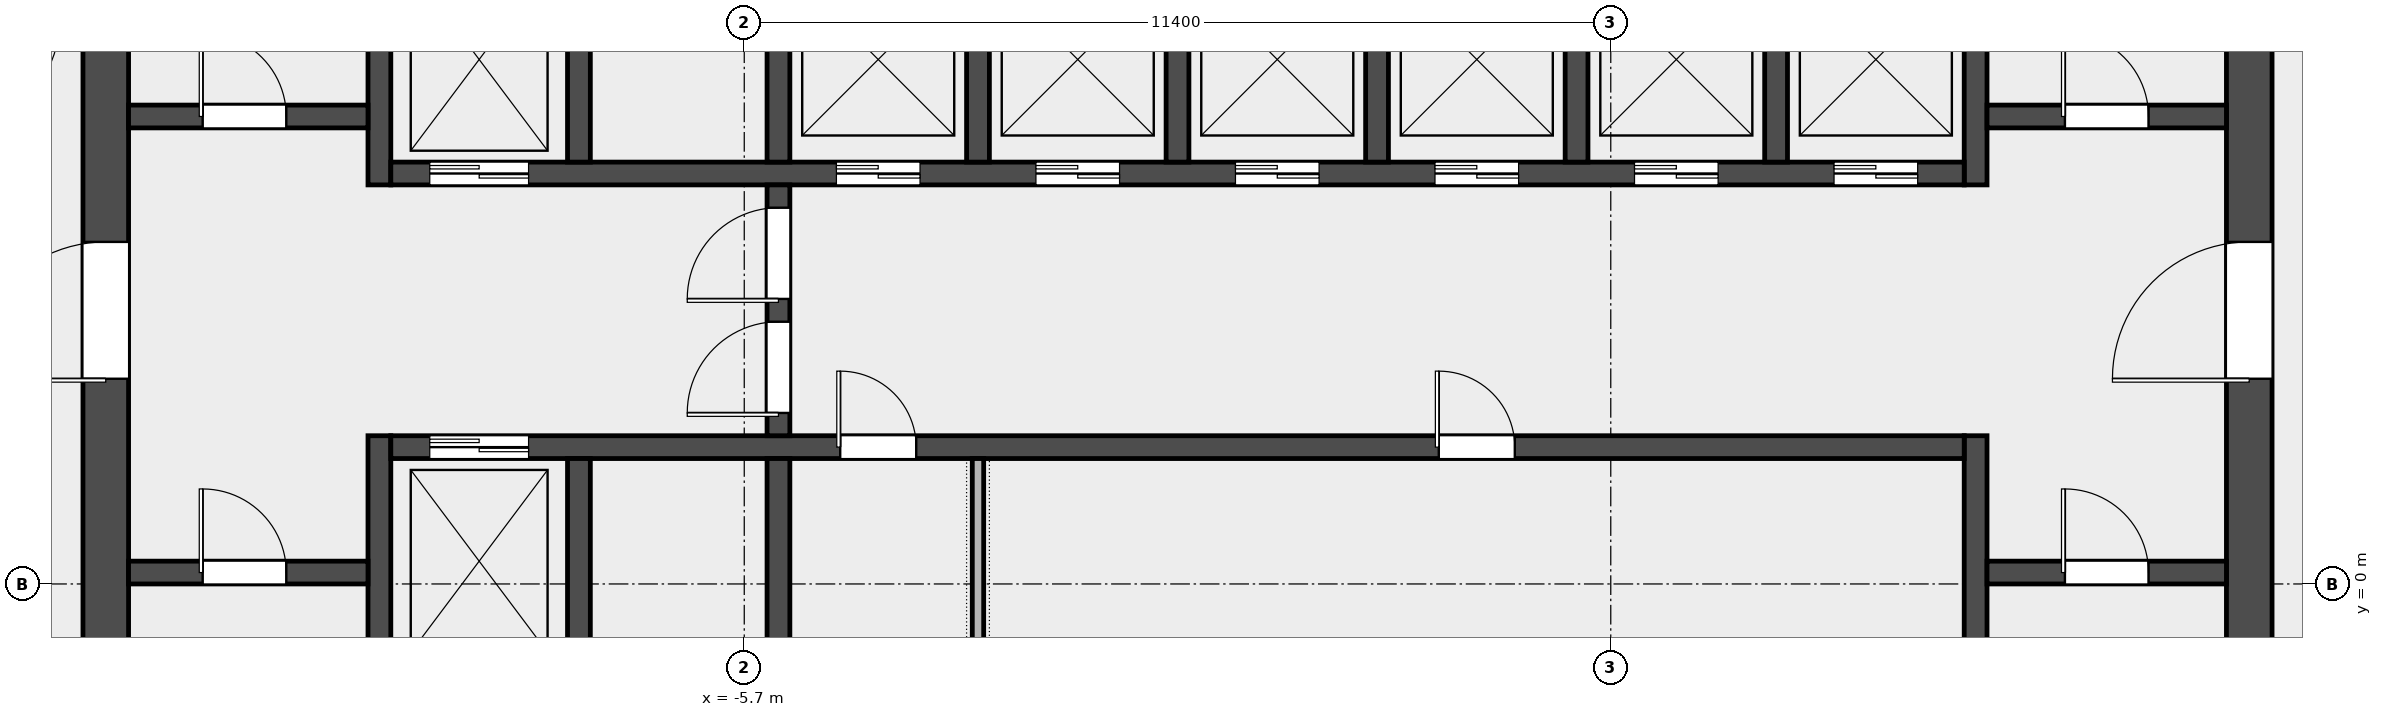
"""IFC4 building model, lengths in metres.
Left out: names, types, materials, properties, quantities, classifications, styles, units other than length and angle.
Written with IfcOpenShell. Run it as: python <this file> out.ifc"""

import sys

from ifc_helpers import new_model, si_unit, direction, frame, frame_2d, origin, place, context, subcontext, project, spatial, rectangle, extrude, element, fill, save


model = new_model("IFC4")
c1 = context("Model", 3, precision=1e-05, world=origin(), true_north=direction((0.0, 1.0)))
c2 = subcontext(c1, "Body", "Model", "MODEL_VIEW")
j1 = project(units=[si_unit("LENGTHUNIT", "METRE"), si_unit("PLANEANGLEUNIT", "RADIAN")], contexts=[c1])
p1 = place(None, origin())
s1 = spatial("IfcSite", under=j1, at=p1, CompositionType="ELEMENT")
p2 = place(p1, origin())
s2 = spatial("IfcBuilding", under=s1, at=p2, CompositionType="ELEMENT")
p3 = place(p2, frame((0.0, 0.0, 235.0)))
s3 = spatial("IfcBuildingStorey", under=s2, at=p3, CompositionType="ELEMENT", Elevation=235.0)
p4 = place(p3, frame((-14.1, -6.6, 0.0), z_axis=(0.0, 0.0, 1.0), x_axis=(0.0, 1.0, 0.0)))
e1 = element("IfcWall", 1, at=p4, inside=s3, PredefinedType="SHEAR", context=c2, shape_type="SweptSolid", body=[
    extrude(rectangle(XDim=19.5, YDim=0.6, at=frame_2d((9.75, 0.0))), origin(), (0.0, 0.0, 1.0), 3.7),
])
p5 = place(p4, frame((9.3, 0.0, 0.0)))
e2 = element("IfcOpeningElement", 2, at=p5, cuts=e1, PredefinedType="OPENING", context=c2, shape_type="SweptSolid", body=[
    extrude(rectangle(XDim=1.8, YDim=2.1, at=frame_2d((0.9, 1.05))), frame((0.0, 0.312, 0.0), z_axis=(0.0, -1.0, 0.0), x_axis=(1.0, 0.0, 0.0)), (0.0, 0.0, 1.0), 0.624),
])
p6 = place(p3, frame((14.1, -6.6, 0.0), z_axis=(0.0, 0.0, 1.0), x_axis=(0.0, 1.0, 0.0)))
e3 = element("IfcWall", 3, at=p6, inside=s3, PredefinedType="SHEAR", context=c2, shape_type="SweptSolid", body=[
    extrude(rectangle(XDim=19.5, YDim=0.6, at=frame_2d((9.75, 0.0))), origin(), (0.0, 0.0, 1.0), 3.7),
])
p7 = place(p6, frame((9.3, 0.0, 0.0)))
e4 = element("IfcOpeningElement", 4, at=p7, cuts=e3, PredefinedType="OPENING", context=c2, shape_type="SweptSolid", body=[
    extrude(rectangle(XDim=1.8, YDim=2.1, at=frame_2d((0.9, 1.05))), frame((0.0, 0.312, 0.0), z_axis=(0.0, -1.0, 0.0), x_axis=(1.0, 0.0, 0.0)), (0.0, 0.0, 1.0), 0.624),
])
p8 = place(p3, frame((-10.5, -6.6, 0.0), z_axis=(0.0, 0.0, 1.0), x_axis=(0.0, 1.0, 0.0)))
e5 = element("IfcWall", 5, at=p8, inside=s3, PredefinedType="SHEAR", context=c2, shape_type="SweptSolid", body=[
    extrude(rectangle(XDim=8.55, YDim=0.3, at=frame_2d((4.275, 0.0))), origin(), (0.0, 0.0, 1.0), 3.7),
])
p9 = place(p3, frame((-10.5, 5.25, 0.0), z_axis=(0.0, 0.0, 1.0), x_axis=(0.0, 1.0, 0.0)))
e6 = element("IfcWall", 6, at=p9, inside=s3, PredefinedType="SHEAR", context=c2, shape_type="SweptSolid", body=[
    extrude(rectangle(XDim=7.65, YDim=0.3, at=frame_2d((3.825, 0.0))), origin(), (0.0, 0.0, 1.0), 3.7),
])
p10 = place(p3, frame((10.5, -6.6, 0.0), z_axis=(0.0, 0.0, 1.0), x_axis=(0.0, 1.0, 0.0)))
e7 = element("IfcWall", 7, at=p10, inside=s3, PredefinedType="SHEAR", context=c2, shape_type="SweptSolid", body=[
    extrude(rectangle(XDim=8.55, YDim=0.3, at=frame_2d((4.275, 0.0))), origin(), (0.0, 0.0, 1.0), 3.7),
])
p11 = place(p3, frame((10.5, 5.25, 0.0), z_axis=(0.0, 0.0, 1.0), x_axis=(0.0, 1.0, 0.0)))
e8 = element("IfcWall", 8, at=p11, inside=s3, PredefinedType="SHEAR", context=c2, shape_type="SweptSolid", body=[
    extrude(rectangle(XDim=7.65, YDim=0.3, at=frame_2d((3.825, 0.0))), origin(), (0.0, 0.0, 1.0), 3.7),
])
p12 = place(p3, frame((-13.8, 0.15, 0.0), z_axis=(0.0, 0.0, 1.0), x_axis=(1.0, 0.0, 0.0)))
e9 = element("IfcWall", 9, at=p12, inside=s3, PredefinedType="SOLIDWALL", context=c2, shape_type="SweptSolid", body=[
    extrude(rectangle(XDim=3.15, YDim=0.3, at=frame_2d((1.575, 0.0))), origin(), (0.0, 0.0, 1.0), 3.7),
])
p13 = place(p12, frame((0.975, 0.0, 0.0)))
e10 = element("IfcOpeningElement", 10, at=p13, cuts=e9, PredefinedType="OPENING", context=c2, shape_type="SweptSolid", body=[
    extrude(rectangle(XDim=1.1, YDim=2.1, at=frame_2d((0.55, 1.05))), frame((0.0, 0.162, 0.0), z_axis=(0.0, -1.0, 0.0), x_axis=(1.0, 0.0, 0.0)), (0.0, 0.0, 1.0), 0.324),
])
p14 = place(p3, frame((-13.8, 6.15, 0.0), z_axis=(0.0, 0.0, 1.0), x_axis=(1.0, 0.0, 0.0)))
e11 = element("IfcWall", 11, at=p14, inside=s3, PredefinedType="SOLIDWALL", context=c2, shape_type="SweptSolid", body=[
    extrude(rectangle(XDim=3.15, YDim=0.3, at=frame_2d((1.575, 0.0))), origin(), (0.0, 0.0, 1.0), 3.7),
])
p15 = place(p14, frame((0.975, 0.0, 0.0)))
e12 = element("IfcOpeningElement", 12, at=p15, cuts=e11, PredefinedType="OPENING", context=c2, shape_type="SweptSolid", body=[
    extrude(rectangle(XDim=1.1, YDim=2.1, at=frame_2d((0.55, 1.05))), frame((0.0, 0.162, 0.0), z_axis=(0.0, -1.0, 0.0), x_axis=(1.0, 0.0, 0.0)), (0.0, 0.0, 1.0), 0.324),
])
p16 = place(p3, frame((10.65, 0.15, 0.0), z_axis=(0.0, 0.0, 1.0), x_axis=(1.0, 0.0, 0.0)))
e13 = element("IfcWall", 13, at=p16, inside=s3, PredefinedType="SOLIDWALL", context=c2, shape_type="SweptSolid", body=[
    extrude(rectangle(XDim=3.15, YDim=0.3, at=frame_2d((1.575, 0.0))), origin(), (0.0, 0.0, 1.0), 3.7),
])
p17 = place(p16, frame((1.025, 0.0, 0.0)))
e14 = element("IfcOpeningElement", 14, at=p17, cuts=e13, PredefinedType="OPENING", context=c2, shape_type="SweptSolid", body=[
    extrude(rectangle(XDim=1.1, YDim=2.1, at=frame_2d((0.55, 1.05))), frame((0.0, 0.162, 0.0), z_axis=(0.0, -1.0, 0.0), x_axis=(1.0, 0.0, 0.0)), (0.0, 0.0, 1.0), 0.324),
])
p18 = place(p3, frame((10.65, 6.15, 0.0), z_axis=(0.0, 0.0, 1.0), x_axis=(1.0, 0.0, 0.0)))
e15 = element("IfcWall", 15, at=p18, inside=s3, PredefinedType="SOLIDWALL", context=c2, shape_type="SweptSolid", body=[
    extrude(rectangle(XDim=3.15, YDim=0.3, at=frame_2d((1.575, 0.0))), origin(), (0.0, 0.0, 1.0), 3.7),
])
p19 = place(p18, frame((1.025, 0.0, 0.0)))
e16 = element("IfcOpeningElement", 16, at=p19, cuts=e15, PredefinedType="OPENING", context=c2, shape_type="SweptSolid", body=[
    extrude(rectangle(XDim=1.1, YDim=2.1, at=frame_2d((0.55, 1.05))), frame((0.0, 0.162, 0.0), z_axis=(0.0, -1.0, 0.0), x_axis=(1.0, 0.0, 0.0)), (0.0, 0.0, 1.0), 0.324),
])
p20 = place(p3, frame((-10.35, 1.8, 0.0), z_axis=(0.0, 0.0, 1.0), x_axis=(1.0, 0.0, 0.0)))
e17 = element("IfcWall", 17, at=p20, inside=s3, PredefinedType="SOLIDWALL", context=c2, shape_type="SweptSolid", body=[
    extrude(rectangle(XDim=20.7, YDim=0.3, at=frame_2d((10.35, 0.0))), origin(), (0.0, 0.0, 1.0), 3.7),
])
p21 = place(p20, frame((0.512, 0.0, 0.0)))
e18 = element("IfcOpeningElement", 18, at=p21, cuts=e17, PredefinedType="OPENING", context=c2, shape_type="SweptSolid", body=[
    extrude(rectangle(XDim=1.3, YDim=2.1, at=frame_2d((0.65, 1.05))), frame((0.0, 0.162, 0.0), z_axis=(0.0, -1.0, 0.0), x_axis=(1.0, 0.0, 0.0)), (0.0, 0.0, 1.0), 0.324),
])
p22 = place(p20, frame((5.913, 0.0, 0.0)))
e19 = element("IfcOpeningElement", 19, at=p22, cuts=e17, PredefinedType="OPENING", context=c2, shape_type="SweptSolid", body=[
    extrude(rectangle(XDim=1.0, YDim=2.1, at=frame_2d((0.5, 1.05))), frame((0.0, 0.162, 0.0), z_axis=(0.0, -1.0, 0.0), x_axis=(1.0, 0.0, 0.0)), (0.0, 0.0, 1.0), 0.324),
])
p23 = place(p20, frame((13.788, 0.0, 0.0)))
e20 = element("IfcOpeningElement", 20, at=p23, cuts=e17, PredefinedType="OPENING", context=c2, shape_type="SweptSolid", body=[
    extrude(rectangle(XDim=1.0, YDim=2.1, at=frame_2d((0.5, 1.05))), frame((0.0, 0.162, 0.0), z_axis=(0.0, -1.0, 0.0), x_axis=(1.0, 0.0, 0.0)), (0.0, 0.0, 1.0), 0.324),
])
p24 = place(p3, frame((-10.35, 5.4, 0.0), z_axis=(0.0, 0.0, 1.0), x_axis=(1.0, 0.0, 0.0)))
e21 = element("IfcWall", 21, at=p24, inside=s3, PredefinedType="SOLIDWALL", context=c2, shape_type="SweptSolid", body=[
    extrude(rectangle(XDim=20.7, YDim=0.3, at=frame_2d((10.35, 0.0))), origin(), (0.0, 0.0, 1.0), 3.7),
])
p25 = place(p24, frame((0.512, 0.0, 0.0)))
e22 = element("IfcOpeningElement", 22, at=p25, cuts=e21, PredefinedType="OPENING", context=c2, shape_type="SweptSolid", body=[
    extrude(rectangle(XDim=1.3, YDim=2.1, at=frame_2d((0.65, 1.05))), frame((0.0, 0.162, 0.0), z_axis=(0.0, -1.0, 0.0), x_axis=(1.0, 0.0, 0.0)), (0.0, 0.0, 1.0), 0.324),
])
p26 = place(p24, frame((5.863, 0.0, 0.0)))
e23 = element("IfcOpeningElement", 23, at=p26, cuts=e21, PredefinedType="OPENING", context=c2, shape_type="SweptSolid", body=[
    extrude(rectangle(XDim=1.1, YDim=2.1, at=frame_2d((0.55, 1.05))), frame((0.0, 0.162, 0.0), z_axis=(0.0, -1.0, 0.0), x_axis=(1.0, 0.0, 0.0)), (0.0, 0.0, 1.0), 0.324),
])
p27 = place(p24, frame((8.488, 0.0, 0.0)))
e24 = element("IfcOpeningElement", 24, at=p27, cuts=e21, PredefinedType="OPENING", context=c2, shape_type="SweptSolid", body=[
    extrude(rectangle(XDim=1.1, YDim=2.1, at=frame_2d((0.55, 1.05))), frame((0.0, 0.162, 0.0), z_axis=(0.0, -1.0, 0.0), x_axis=(1.0, 0.0, 0.0)), (0.0, 0.0, 1.0), 0.324),
])
p28 = place(p24, frame((11.113, 0.0, 0.0)))
e25 = element("IfcOpeningElement", 25, at=p28, cuts=e21, PredefinedType="OPENING", context=c2, shape_type="SweptSolid", body=[
    extrude(rectangle(XDim=1.1, YDim=2.1, at=frame_2d((0.55, 1.05))), frame((0.0, 0.162, 0.0), z_axis=(0.0, -1.0, 0.0), x_axis=(1.0, 0.0, 0.0)), (0.0, 0.0, 1.0), 0.324),
])
p29 = place(p24, frame((13.738, 0.0, 0.0)))
e26 = element("IfcOpeningElement", 26, at=p29, cuts=e21, PredefinedType="OPENING", context=c2, shape_type="SweptSolid", body=[
    extrude(rectangle(XDim=1.1, YDim=2.1, at=frame_2d((0.55, 1.05))), frame((0.0, 0.162, 0.0), z_axis=(0.0, -1.0, 0.0), x_axis=(1.0, 0.0, 0.0)), (0.0, 0.0, 1.0), 0.324),
])
p30 = place(p24, frame((16.363, 0.0, 0.0)))
e27 = element("IfcOpeningElement", 27, at=p30, cuts=e21, PredefinedType="OPENING", context=c2, shape_type="SweptSolid", body=[
    extrude(rectangle(XDim=1.1, YDim=2.1, at=frame_2d((0.55, 1.05))), frame((0.0, 0.162, 0.0), z_axis=(0.0, -1.0, 0.0), x_axis=(1.0, 0.0, 0.0)), (0.0, 0.0, 1.0), 0.324),
])
p31 = place(p24, frame((18.988, 0.0, 0.0)))
e28 = element("IfcOpeningElement", 28, at=p31, cuts=e21, PredefinedType="OPENING", context=c2, shape_type="SweptSolid", body=[
    extrude(rectangle(XDim=1.1, YDim=2.1, at=frame_2d((0.55, 1.05))), frame((0.0, 0.162, 0.0), z_axis=(0.0, -1.0, 0.0), x_axis=(1.0, 0.0, 0.0)), (0.0, 0.0, 1.0), 0.324),
])
for number, where, z_axis, x_axis in (
    (29, (-7.875, -1.05, 0.0), (0.0, 0.0, 1.0), (0.0, 1.0, 0.0)),
    (30, (-5.25, -1.05, 0.0), (0.0, 0.0, 1.0), (0.0, 1.0, 0.0)),
    (31, (-7.875, 5.55, 0.0), (0.0, 0.0, 1.0), (0.0, 1.0, 0.0)),
    (32, (-5.25, 5.55, 0.0), (0.0, 0.0, 1.0), (0.0, 1.0, 0.0)),
    (33, (-2.625, 5.55, 0.0), (0.0, 0.0, 1.0), (0.0, 1.0, 0.0)),
    (34, (0.0, 5.55, 0.0), (0.0, 0.0, 1.0), (0.0, 1.0, 0.0)),
    (35, (2.625, 5.55, 0.0), (0.0, 0.0, 1.0), (0.0, 1.0, 0.0)),
    (36, (5.25, 5.55, 0.0), (0.0, 0.0, 1.0), (0.0, 1.0, 0.0)),
    (37, (7.875, 5.55, 0.0), (0.0, 0.0, 1.0), (0.0, 1.0, 0.0)),
):
    element("IfcWall", number, at=place(p3, frame(where, z_axis=z_axis, x_axis=x_axis)), inside=s3, PredefinedType="SOLIDWALL", context=c2, shape_type="SweptSolid", body=[
        extrude(rectangle(XDim=2.7, YDim=0.3, at=frame_2d((1.35, 0.0))), origin(), (0.0, 0.0, 1.0), 3.7),
    ])
p32 = place(p3, frame((-5.25, 1.95, 0.0), z_axis=(0.0, 0.0, 1.0), x_axis=(0.0, 1.0, 0.0)))
e38 = element("IfcWall", 38, at=p32, inside=s3, PredefinedType="SOLIDWALL", context=c2, shape_type="SweptSolid", body=[
    extrude(rectangle(XDim=3.3, YDim=0.3, at=frame_2d((1.65, 0.0))), origin(), (0.0, 0.0, 1.0), 3.7),
])
p33 = place(p32, frame((0.3, 0.0, 0.0)))
e39 = element("IfcOpeningElement", 39, at=p33, cuts=e38, PredefinedType="OPENING", context=c2, shape_type="SweptSolid", body=[
    extrude(rectangle(XDim=1.2, YDim=2.1, at=frame_2d((0.6, 1.05))), frame((0.0, 0.162, 0.0), z_axis=(0.0, -1.0, 0.0), x_axis=(1.0, 0.0, 0.0)), (0.0, 0.0, 1.0), 0.324),
])
p34 = place(p32, frame((1.8, 0.0, 0.0)))
e40 = element("IfcOpeningElement", 40, at=p34, cuts=e38, PredefinedType="OPENING", context=c2, shape_type="SweptSolid", body=[
    extrude(rectangle(XDim=1.2, YDim=2.1, at=frame_2d((0.6, 1.05))), frame((0.0, 0.162, 0.0), z_axis=(0.0, -1.0, 0.0), x_axis=(1.0, 0.0, 0.0)), (0.0, 0.0, 1.0), 0.324),
])
p35 = place(p3, frame((-2.625, -1.05, 0.0), z_axis=(0.0, 0.0, 1.0), x_axis=(0.0, 1.0, 0.0)))
e41 = element("IfcWall", 41, at=p35, inside=s3, PredefinedType="PARTITIONING", context=c2, shape_type="SweptSolid", body=[
    extrude(rectangle(XDim=2.7, YDim=0.15, at=frame_2d((1.35, 0.0))), origin(), (0.0, 0.0, 1.0), 3.7),
])
p36 = place(p13, origin())
e42 = element("IfcDoor", 42, at=p36, inside=s3, OperationType="SINGLE_SWING_LEFT", PredefinedType="DOOR", context=c2, shape_type="SweptSolid", body=[
    extrude(rectangle(XDim=1.1, YDim=2.1, at=frame_2d((0.55, 1.05))), frame((0.0, 0.025, 0.0), z_axis=(0.0, -1.0, 0.0), x_axis=(1.0, 0.0, 0.0)), (0.0, 0.0, 1.0), 0.05),
])
fill(e10, e42)
p37 = place(p15, origin())
e43 = element("IfcDoor", 43, at=p37, inside=s3, OperationType="SINGLE_SWING_LEFT", PredefinedType="DOOR", context=c2, shape_type="SweptSolid", body=[
    extrude(rectangle(XDim=1.1, YDim=2.1, at=frame_2d((0.55, 1.05))), frame((0.0, 0.025, 0.0), z_axis=(0.0, -1.0, 0.0), x_axis=(1.0, 0.0, 0.0)), (0.0, 0.0, 1.0), 0.05),
])
fill(e12, e43)
p38 = place(p17, origin())
e44 = element("IfcDoor", 44, at=p38, inside=s3, OperationType="SINGLE_SWING_RIGHT", PredefinedType="DOOR", context=c2, shape_type="SweptSolid", body=[
    extrude(rectangle(XDim=1.1, YDim=2.1, at=frame_2d((0.55, 1.05))), frame((0.0, 0.025, 0.0), z_axis=(0.0, -1.0, 0.0), x_axis=(1.0, 0.0, 0.0)), (0.0, 0.0, 1.0), 0.05),
])
fill(e14, e44)
p39 = place(p19, origin())
e45 = element("IfcDoor", 45, at=p39, inside=s3, OperationType="SINGLE_SWING_RIGHT", PredefinedType="DOOR", context=c2, shape_type="SweptSolid", body=[
    extrude(rectangle(XDim=1.1, YDim=2.1, at=frame_2d((0.55, 1.05))), frame((0.0, 0.025, 0.0), z_axis=(0.0, -1.0, 0.0), x_axis=(1.0, 0.0, 0.0)), (0.0, 0.0, 1.0), 0.05),
])
fill(e16, e45)
p40 = place(p5, origin())
e46 = element("IfcDoor", 46, at=p40, inside=s3, OperationType="DOUBLE_DOOR_SINGLE_SWING", PredefinedType="DOOR", context=c2, shape_type="SweptSolid", body=[
    extrude(rectangle(XDim=1.8, YDim=2.1, at=frame_2d((0.9, 1.05))), frame((0.0, 0.025, 0.0), z_axis=(0.0, -1.0, 0.0), x_axis=(1.0, 0.0, 0.0)), (0.0, 0.0, 1.0), 0.05),
])
fill(e2, e46)
p41 = place(p7, origin())
e47 = element("IfcDoor", 47, at=p41, inside=s3, OperationType="DOUBLE_DOOR_SINGLE_SWING", PredefinedType="DOOR", context=c2, shape_type="SweptSolid", body=[
    extrude(rectangle(XDim=1.8, YDim=2.1, at=frame_2d((0.9, 1.05))), frame((0.0, 0.025, 0.0), z_axis=(0.0, -1.0, 0.0), x_axis=(1.0, 0.0, 0.0)), (0.0, 0.0, 1.0), 0.05),
])
fill(e4, e47)
p42 = place(p33, origin())
e48 = element("IfcDoor", 48, at=p42, inside=s3, OperationType="SINGLE_SWING_LEFT", PredefinedType="DOOR", context=c2, shape_type="SweptSolid", body=[
    extrude(rectangle(XDim=1.2, YDim=2.1, at=frame_2d((0.6, 1.05))), frame((0.0, 0.025, 0.0), z_axis=(0.0, -1.0, 0.0), x_axis=(1.0, 0.0, 0.0)), (0.0, 0.0, 1.0), 0.05),
])
fill(e39, e48)
p43 = place(p34, origin())
e49 = element("IfcDoor", 49, at=p43, inside=s3, OperationType="SINGLE_SWING_RIGHT", PredefinedType="DOOR", context=c2, shape_type="SweptSolid", body=[
    extrude(rectangle(XDim=1.2, YDim=2.1, at=frame_2d((0.6, 1.05))), frame((0.0, 0.025, 0.0), z_axis=(0.0, -1.0, 0.0), x_axis=(1.0, 0.0, 0.0)), (0.0, 0.0, 1.0), 0.05),
])
fill(e40, e49)
p44 = place(p21, origin())
e50 = element("IfcDoor", 50, at=p44, inside=s3, OperationType="DOUBLE_DOOR_SLIDING", PredefinedType="DOOR", context=c2, shape_type="SweptSolid", body=[
    extrude(rectangle(XDim=1.3, YDim=2.1, at=frame_2d((0.65, 1.05))), frame((0.0, 0.025, 0.0), z_axis=(0.0, -1.0, 0.0), x_axis=(1.0, 0.0, 0.0)), (0.0, 0.0, 1.0), 0.05),
])
fill(e18, e50)
p45 = place(p25, origin())
e51 = element("IfcDoor", 51, at=p45, inside=s3, OperationType="DOUBLE_DOOR_SLIDING", PredefinedType="DOOR", context=c2, shape_type="SweptSolid", body=[
    extrude(rectangle(XDim=1.3, YDim=2.1, at=frame_2d((0.65, 1.05))), frame((0.0, 0.025, 0.0), z_axis=(0.0, -1.0, 0.0), x_axis=(1.0, 0.0, 0.0)), (0.0, 0.0, 1.0), 0.05),
])
fill(e22, e51)
p46 = place(p26, origin())
e52 = element("IfcDoor", 52, at=p46, inside=s3, OperationType="DOUBLE_DOOR_SLIDING", PredefinedType="DOOR", context=c2, shape_type="SweptSolid", body=[
    extrude(rectangle(XDim=1.1, YDim=2.1, at=frame_2d((0.55, 1.05))), frame((0.0, 0.025, 0.0), z_axis=(0.0, -1.0, 0.0), x_axis=(1.0, 0.0, 0.0)), (0.0, 0.0, 1.0), 0.05),
])
fill(e23, e52)
p47 = place(p27, origin())
e53 = element("IfcDoor", 53, at=p47, inside=s3, OperationType="DOUBLE_DOOR_SLIDING", PredefinedType="DOOR", context=c2, shape_type="SweptSolid", body=[
    extrude(rectangle(XDim=1.1, YDim=2.1, at=frame_2d((0.55, 1.05))), frame((0.0, 0.025, 0.0), z_axis=(0.0, -1.0, 0.0), x_axis=(1.0, 0.0, 0.0)), (0.0, 0.0, 1.0), 0.05),
])
fill(e24, e53)
p48 = place(p28, origin())
e54 = element("IfcDoor", 54, at=p48, inside=s3, OperationType="DOUBLE_DOOR_SLIDING", PredefinedType="DOOR", context=c2, shape_type="SweptSolid", body=[
    extrude(rectangle(XDim=1.1, YDim=2.1, at=frame_2d((0.55, 1.05))), frame((0.0, 0.025, 0.0), z_axis=(0.0, -1.0, 0.0), x_axis=(1.0, 0.0, 0.0)), (0.0, 0.0, 1.0), 0.05),
])
fill(e25, e54)
p49 = place(p29, origin())
e55 = element("IfcDoor", 55, at=p49, inside=s3, OperationType="DOUBLE_DOOR_SLIDING", PredefinedType="DOOR", context=c2, shape_type="SweptSolid", body=[
    extrude(rectangle(XDim=1.1, YDim=2.1, at=frame_2d((0.55, 1.05))), frame((0.0, 0.025, 0.0), z_axis=(0.0, -1.0, 0.0), x_axis=(1.0, 0.0, 0.0)), (0.0, 0.0, 1.0), 0.05),
])
fill(e26, e55)
p50 = place(p30, origin())
e56 = element("IfcDoor", 56, at=p50, inside=s3, OperationType="DOUBLE_DOOR_SLIDING", PredefinedType="DOOR", context=c2, shape_type="SweptSolid", body=[
    extrude(rectangle(XDim=1.1, YDim=2.1, at=frame_2d((0.55, 1.05))), frame((0.0, 0.025, 0.0), z_axis=(0.0, -1.0, 0.0), x_axis=(1.0, 0.0, 0.0)), (0.0, 0.0, 1.0), 0.05),
])
fill(e27, e56)
p51 = place(p31, origin())
e57 = element("IfcDoor", 57, at=p51, inside=s3, OperationType="DOUBLE_DOOR_SLIDING", PredefinedType="DOOR", context=c2, shape_type="SweptSolid", body=[
    extrude(rectangle(XDim=1.1, YDim=2.1, at=frame_2d((0.55, 1.05))), frame((0.0, 0.025, 0.0), z_axis=(0.0, -1.0, 0.0), x_axis=(1.0, 0.0, 0.0)), (0.0, 0.0, 1.0), 0.05),
])
fill(e28, e57)
p52 = place(p22, origin())
e58 = element("IfcDoor", 58, at=p52, inside=s3, OperationType="SINGLE_SWING_LEFT", PredefinedType="DOOR", context=c2, shape_type="SweptSolid", body=[
    extrude(rectangle(XDim=1.0, YDim=2.1, at=frame_2d((0.5, 1.05))), frame((0.0, 0.025, 0.0), z_axis=(0.0, -1.0, 0.0), x_axis=(1.0, 0.0, 0.0)), (0.0, 0.0, 1.0), 0.05),
])
fill(e19, e58)
p53 = place(p23, origin())
e59 = element("IfcDoor", 59, at=p53, inside=s3, OperationType="SINGLE_SWING_LEFT", PredefinedType="DOOR", context=c2, shape_type="SweptSolid", body=[
    extrude(rectangle(XDim=1.0, YDim=2.1, at=frame_2d((0.5, 1.05))), frame((0.0, 0.025, 0.0), z_axis=(0.0, -1.0, 0.0), x_axis=(1.0, 0.0, 0.0)), (0.0, 0.0, 1.0), 0.05),
])
fill(e20, e59)
save(model, sys.argv[1])
